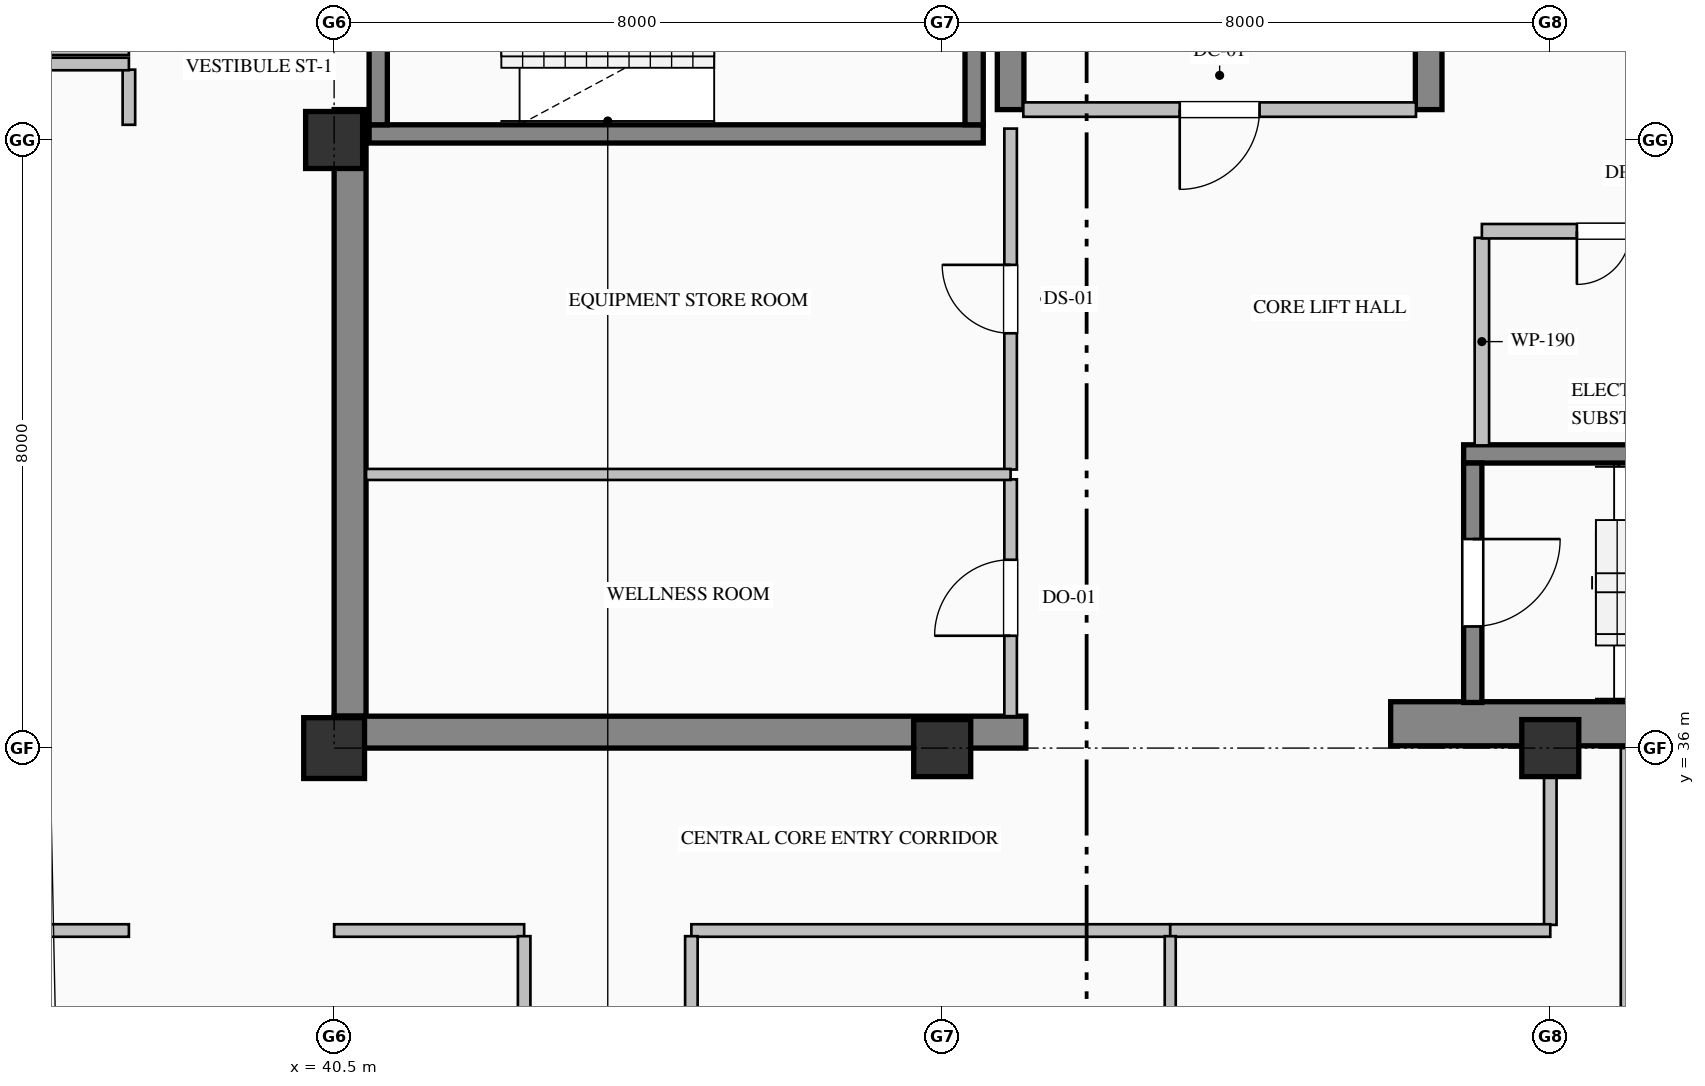
"""IFC4 building model, lengths in metres.
Left out: names, types, materials, properties, quantities, classifications, styles, units other than length and angle.
Written with IfcOpenShell. Run it as: python <this file> out.ifc"""

import sys

from ifc_helpers import new_model, si_unit, direction, frame, frame_2d, origin, origin_2d, place, context, subcontext, project, spatial, rectangle, hollow_rectangle, extrude, element, fill, save


model = new_model("IFC4")
c1 = context("Model", 3, precision=1e-05, world=origin(), true_north=direction((0.0, 1.0)))
c2 = subcontext(c1, "Body", "Model", "MODEL_VIEW")
j1 = project(units=[si_unit("LENGTHUNIT", "METRE"), si_unit("PLANEANGLEUNIT", "RADIAN")], contexts=[c1])
p1 = place(None, origin())
s1 = spatial("IfcSite", under=j1, at=p1, CompositionType="ELEMENT")
p2 = place(p1, origin())
s2 = spatial("IfcBuilding", under=s1, at=p2, CompositionType="ELEMENT")
p3 = place(p2, frame((0.0, 0.0, 331.2)))
s3 = spatial("IfcBuildingStorey", under=s2, at=p3, CompositionType="ELEMENT", Elevation=331.2)
p4 = place(p3, frame((40.71, 36.42, 0.0), z_axis=(0.0, 0.0, 1.0), x_axis=(0.0, 1.0, 0.0)))
e1 = element("IfcWall", 1, at=p4, inside=s3, PredefinedType="SHEAR", context=c2, shape_type="SweptSolid", body=[
    extrude(rectangle(XDim=7.98, YDim=0.42, at=frame_2d((3.99, 0.0))), origin(), (0.0, 0.0, 1.0), 3.785),
])
p5 = place(p3, frame((40.5, 36.21, 0.0), z_axis=(0.0, 0.0, 1.0), x_axis=(1.0, 0.0, 0.0)))
e2 = element("IfcWall", 2, at=p5, inside=s3, PredefinedType="SHEAR", context=c2, shape_type="SweptSolid", body=[
    extrude(rectangle(XDim=9.1, YDim=0.42, at=frame_2d((4.55, 0.0))), origin(), (0.0, 0.0, 1.0), 3.785),
])
p6 = place(p3, frame((54.4, 36.32, 0.0), z_axis=(0.0, 0.0, 1.0), x_axis=(1.0, 0.0, 0.0)))
e3 = element("IfcWall", 3, at=p6, inside=s3, PredefinedType="SHEAR", context=c2, shape_type="SweptSolid", body=[
    extrude(rectangle(XDim=9.6, YDim=0.58, at=frame_2d((4.8, 0.0))), origin(), (0.0, 0.0, 1.0), 4.0),
])
p7 = place(p3, frame((49.4, 44.4, 0.0), z_axis=(0.0, 0.0, 1.0), x_axis=(0.0, 1.0, 0.0)))
e4 = element("IfcWall", 4, at=p7, inside=s3, PredefinedType="SHEAR", context=c2, shape_type="SweptSolid", body=[
    extrude(rectangle(XDim=3.0, YDim=0.35, at=frame_2d((1.5, 0.0))), origin(), (0.0, 0.0, 1.0), 3.785),
])
p8 = place(p3, frame((54.9, 44.4, 0.0), z_axis=(0.0, 0.0, 1.0), x_axis=(0.0, 1.0, 0.0)))
e5 = element("IfcWall", 5, at=p8, inside=s3, PredefinedType="SHEAR", context=c2, shape_type="SweptSolid", body=[
    extrude(rectangle(XDim=7.18, YDim=0.35, at=frame_2d((3.59, 0.0))), origin(), (0.0, 0.0, 1.0), 3.785),
])
p9 = place(p3, frame((40.5, 36.0, 0.0), z_axis=(0.0, 0.0, 1.0), x_axis=(1.0, 0.0, 0.0)))
e6 = element("IfcColumn", 6, at=p9, inside=s3, PredefinedType="COLUMN", context=c2, shape_type="SweptSolid", body=[
    extrude(hollow_rectangle(XDim=0.8, YDim=0.8, WallThickness=0.032, at=origin_2d()), origin(), (0.0, 0.0, 1.0), 4.0),
])
for number, where, z_axis, x_axis in (
    (7, (40.5, 44.0, 0.0), (0.0, 0.0, 1.0), (1.0, 0.0, 0.0)),
    (8, (48.5, 36.0, 0.0), (0.0, 0.0, 1.0), (1.0, 0.0, 0.0)),
    (9, (56.5, 36.0, 0.0), (0.0, 0.0, 1.0), (1.0, 0.0, 0.0)),
):
    element("IfcColumn", number, at=place(p3, frame(where, z_axis=z_axis, x_axis=x_axis)), inside=s3, PredefinedType="COLUMN", context=c2, shape_type="SweptSolid", body=[
        extrude(rectangle(XDim=0.75, YDim=0.75, at=origin_2d()), origin(), (0.0, 0.0, 1.0), 4.0),
    ])
p10 = place(p3, frame((49.04, 44.08, 0.0), z_axis=(0.0, 0.0, 1.0), x_axis=(-1.0, 0.0, 0.0)))
e10 = element("IfcWall", 10, at=p10, inside=s3, PredefinedType="SOLIDWALL", context=c2, shape_type="SweptSolid", body=[
    extrude(rectangle(XDim=8.08, YDim=0.24, at=frame_2d((4.04, 0.0))), origin(), (0.0, 0.0, 1.0), 4.0),
])
p11 = place(p3, frame((41.08, 47.35, 0.0), z_axis=(0.0, 0.0, 1.0), x_axis=(0.0, -1.0, 0.0)))
e11 = element("IfcWall", 11, at=p11, inside=s3, PredefinedType="SOLIDWALL", context=c2, shape_type="SweptSolid", body=[
    extrude(rectangle(XDim=3.15, YDim=0.24, at=frame_2d((1.575, 0.0))), origin(), (0.0, 0.0, 1.0), 4.0),
])
p12 = place(p11, frame((1.0, 0.0, 0.0)))
e12 = element("IfcOpeningElement", 12, at=p12, cuts=e11, PredefinedType="OPENING", context=c2, shape_type="SweptSolid", body=[
    extrude(rectangle(XDim=1.15, YDim=2.2, at=frame_2d((0.575, 1.1))), frame((0.0, 0.13, 0.0), z_axis=(0.0, -1.0, 0.0), x_axis=(1.0, 0.0, 0.0)), (0.0, 0.0, 1.0), 0.26),
])
p13 = place(p3, frame((48.92, 44.2, 0.0), z_axis=(0.0, 0.0, 1.0), x_axis=(0.0, 1.0, 0.0)))
e13 = element("IfcWall", 13, at=p13, inside=s3, PredefinedType="SOLIDWALL", context=c2, shape_type="SweptSolid", body=[
    extrude(rectangle(XDim=3.15, YDim=0.24, at=frame_2d((1.575, 0.0))), origin(), (0.0, 0.0, 1.0), 4.0),
])
p14 = place(p3, frame((55.36, 39.87, 0.0), z_axis=(0.0, 0.0, 1.0), x_axis=(1.0, 0.0, 0.0)))
e14 = element("IfcWall", 14, at=p14, inside=s3, PredefinedType="SOLIDWALL", context=c2, shape_type="SweptSolid", body=[
    extrude(rectangle(XDim=8.08, YDim=0.24, at=frame_2d((4.04, 0.0))), origin(), (0.0, 0.0, 1.0), 4.0),
])
p15 = place(p3, frame((55.48, 39.75, 0.0), z_axis=(0.0, 0.0, 1.0), x_axis=(0.0, -1.0, 0.0)))
e15 = element("IfcWall", 15, at=p15, inside=s3, PredefinedType="SOLIDWALL", context=c2, shape_type="SweptSolid", body=[
    extrude(rectangle(XDim=3.15, YDim=0.24, at=frame_2d((1.575, 0.0))), origin(), (0.0, 0.0, 1.0), 4.0),
])
p16 = place(p15, frame((1.0, 0.0, 0.0)))
e16 = element("IfcOpeningElement", 16, at=p16, cuts=e15, PredefinedType="OPENING", context=c2, shape_type="SweptSolid", body=[
    extrude(rectangle(XDim=1.15, YDim=2.2, at=frame_2d((0.575, 1.1))), frame((0.0, 0.13, 0.0), z_axis=(0.0, -1.0, 0.0), x_axis=(1.0, 0.0, 0.0)), (0.0, 0.0, 1.0), 0.26),
])
p17 = place(p3, frame((37.8, 44.2, 0.0), z_axis=(0.0, 0.0, 1.0), x_axis=(0.0, 1.0, 0.0)))
e17 = element("IfcWall", 17, at=p17, inside=s3, PredefinedType="PARTITIONING", context=c2, shape_type="SweptSolid", body=[
    extrude(rectangle(XDim=0.726, YDim=0.165, at=frame_2d((0.363, 0.0))), origin(), (0.0, 0.0, 1.0), 3.785),
])
p18 = place(p3, frame((54.733, 44.4, 0.0), z_axis=(0.0, 0.0, 1.0), x_axis=(-1.0, 0.0, 0.0)))
e18 = element("IfcWall", 18, at=p18, inside=s3, PredefinedType="PARTITIONING", context=c2, shape_type="SweptSolid", body=[
    extrude(rectangle(XDim=5.166, YDim=0.19, at=frame_2d((2.583, 0.0))), origin(), (0.0, 0.0, 1.0), 3.785),
])
p19 = place(p18, frame((2.058, 0.0, 0.0)))
e19 = element("IfcOpeningElement", 19, at=p19, cuts=e18, PredefinedType="OPENING", context=c2, shape_type="SweptSolid", body=[
    extrude(rectangle(XDim=1.05, YDim=2.15, at=frame_2d((0.525, 1.075))), frame((0.0, 0.105, 0.0), z_axis=(0.0, -1.0, 0.0), x_axis=(1.0, 0.0, 0.0)), (0.0, 0.0, 1.0), 0.21),
])
p20 = place(p3, frame((49.4, 36.42, 0.0), z_axis=(0.0, 0.0, 1.0), x_axis=(0.0, 1.0, 0.0)))
e20 = element("IfcWall", 20, at=p20, inside=s3, PredefinedType="PARTITIONING", context=c2, shape_type="SweptSolid", body=[
    extrude(rectangle(XDim=3.115, YDim=0.165, at=frame_2d((1.558, 0.0))), origin(), (0.0, 0.0, 1.0), 3.027),
])
p21 = place(p20, frame((1.058, 0.0, 0.0)))
e21 = element("IfcOpeningElement", 21, at=p21, cuts=e20, PredefinedType="OPENING", context=c2, shape_type="SweptSolid", body=[
    extrude(rectangle(XDim=1.0, YDim=2.15, at=frame_2d((0.5, 1.075))), frame((0.0, 0.093, 0.0), z_axis=(0.0, -1.0, 0.0), x_axis=(1.0, 0.0, 0.0)), (0.0, 0.0, 1.0), 0.185),
])
p22 = place(p3, frame((49.4, 39.665, 0.0), z_axis=(0.0, 0.0, 1.0), x_axis=(0.0, 1.0, 0.0)))
e22 = element("IfcWall", 22, at=p22, inside=s3, PredefinedType="PARTITIONING", context=c2, shape_type="SweptSolid", body=[
    extrude(rectangle(XDim=4.485, YDim=0.165, at=frame_2d((2.243, 0.0))), origin(), (0.0, 0.0, 1.0), 3.027),
])
p23 = place(p22, frame((1.793, 0.0, 0.0)))
e23 = element("IfcOpeningElement", 23, at=p23, cuts=e22, PredefinedType="OPENING", context=c2, shape_type="SweptSolid", body=[
    extrude(rectangle(XDim=0.9, YDim=2.15, at=frame_2d((0.45, 1.075))), frame((0.0, 0.093, 0.0), z_axis=(0.0, -1.0, 0.0), x_axis=(1.0, 0.0, 0.0)), (0.0, 0.0, 1.0), 0.185),
])
p24 = place(p3, frame((55.6, 42.713, 0.0), z_axis=(0.0, 0.0, 1.0), x_axis=(0.0, -1.0, 0.0)))
e24 = element("IfcWall", 24, at=p24, inside=s3, PredefinedType="PARTITIONING", context=c2, shape_type="SweptSolid", body=[
    extrude(rectangle(XDim=2.731, YDim=0.19, at=frame_2d((1.365, 0.0))), origin(), (0.0, 0.0, 1.0), 3.785),
])
p25 = place(p3, frame((40.92, 39.6, 0.0), z_axis=(0.0, 0.0, 1.0), x_axis=(1.0, 0.0, 0.0)))
e25 = element("IfcWall", 25, at=p25, inside=s3, PredefinedType="PARTITIONING", context=c2, shape_type="SweptSolid", body=[
    extrude(rectangle(XDim=8.48, YDim=0.145, at=frame_2d((4.24, 0.0))), origin(), (0.0, 0.0, 1.0), 3.785),
])
p26 = place(p3, frame((59.5, 42.8, 0.0), z_axis=(0.0, 0.0, 1.0), x_axis=(-1.0, 0.0, 0.0)))
e26 = element("IfcWall", 26, at=p26, inside=s3, PredefinedType="PARTITIONING", context=c2, shape_type="SweptSolid", body=[
    extrude(rectangle(XDim=3.9, YDim=0.19, at=frame_2d((1.95, 0.0))), origin(), (0.0, 0.0, 1.0), 3.785),
])
p27 = place(p26, frame((1.25, 0.0, 0.0)))
e27 = element("IfcOpeningElement", 27, at=p27, cuts=e26, PredefinedType="OPENING", context=c2, shape_type="SweptSolid", body=[
    extrude(rectangle(XDim=1.4, YDim=2.25, at=frame_2d((0.7, 1.125))), frame((0.0, 0.105, 0.0), z_axis=(0.0, -1.0, 0.0), x_axis=(1.0, 0.0, 0.0)), (0.0, 0.0, 1.0), 0.21),
])
p28 = place(p3, frame((37.8, 45.2, 0.0), z_axis=(0.0, 0.0, 1.0), x_axis=(-1.0, 0.0, 0.0)))
e28 = element("IfcWall", 28, at=p28, inside=s3, PredefinedType="PARTITIONING", context=c2, shape_type="SweptSolid", body=[
    extrude(rectangle(XDim=13.3, YDim=0.165, at=frame_2d((6.65, 0.0))), origin(), (0.0, 0.0, 1.0), 3.785),
])
p29 = place(p28, frame((6.15, 0.0, 0.0)))
e29 = element("IfcOpeningElement", 29, at=p29, cuts=e28, PredefinedType="OPENING", context=c2, shape_type="SweptSolid", body=[
    extrude(rectangle(XDim=1.0, YDim=2.15, at=frame_2d((0.5, 1.075))), frame((0.0, 0.093, 0.0), z_axis=(0.0, -1.0, 0.0), x_axis=(1.0, 0.0, 0.0)), (0.0, 0.0, 1.0), 0.185),
])
for number, where, z_axis, x_axis in (
    (30, (37.8, 33.6, 0.0), (0.0, 0.0, 1.0), (-1.0, 0.0, 0.0)),
    (31, (35.4, 45.0, 0.0), (0.0, 0.0, 1.0), (1.0, 0.0, 0.0)),
):
    element("IfcWall", number, at=place(p3, frame(where, z_axis=z_axis, x_axis=x_axis)), inside=s3, PredefinedType="PARTITIONING", context=c2, shape_type="SweptSolid", body=[
        extrude(rectangle(XDim=2.4, YDim=0.165, at=frame_2d((1.2, 0.0))), origin(), (0.0, 0.0, 1.0), 3.785),
    ])
p30 = place(p3, frame((51.5, 33.6, 0.0), z_axis=(0.0, 0.0, 1.0), x_axis=(-1.0, 0.0, 0.0)))
e32 = element("IfcWall", 32, at=p30, inside=s3, PredefinedType="PARTITIONING", context=c2, shape_type="SweptSolid", body=[
    extrude(rectangle(XDim=6.3, YDim=0.165, at=frame_2d((3.15, 0.0))), origin(), (0.0, 0.0, 1.0), 3.785),
])
p31 = place(p3, frame((56.5, 36.0, 0.0), z_axis=(0.0, 0.0, 1.0), x_axis=(0.0, -1.0, 0.0)))
e33 = element("IfcWall", 33, at=p31, inside=s3, PredefinedType="PARTITIONING", context=c2, shape_type="SweptSolid", body=[
    extrude(rectangle(XDim=2.325, YDim=0.165, at=frame_2d((1.163, 0.0))), origin(), (0.0, 0.0, 1.0), 3.177),
])
p32 = place(p3, frame((56.5, 33.6, 0.0), z_axis=(0.0, 0.0, 1.0), x_axis=(-1.0, 0.0, 0.0)))
e34 = element("IfcWall", 34, at=p32, inside=s3, PredefinedType="PARTITIONING", context=c2, shape_type="SweptSolid", body=[
    extrude(rectangle(XDim=5.0, YDim=0.165, at=frame_2d((2.5, 0.0))), origin(), (0.0, 0.0, 1.0), 3.785),
])
p33 = place(p3, frame((43.0, 33.6, 0.0), z_axis=(0.0, 0.0, 1.0), x_axis=(-1.0, 0.0, 0.0)))
e35 = element("IfcWall", 35, at=p33, inside=s3, PredefinedType="PARTITIONING", context=c2, shape_type="SweptSolid", body=[
    extrude(rectangle(XDim=2.5, YDim=0.165, at=frame_2d((1.25, 0.0))), origin(), (0.0, 0.0, 1.0), 3.785),
])
p34 = place(p3, frame((45.2, 33.525, 0.0), z_axis=(0.0, 0.0, 1.0), x_axis=(0.0, -1.0, 0.0)))
e36 = element("IfcWall", 36, at=p34, inside=s3, PredefinedType="PARTITIONING", context=c2, shape_type="SweptSolid", body=[
    extrude(rectangle(XDim=8.451, YDim=0.165, at=frame_2d((4.226, 0.0))), origin(), (0.0, 0.0, 1.0), 3.785),
])
p35 = place(p34, frame((3.726, 0.0, 0.0)))
e37 = element("IfcOpeningElement", 37, at=p35, cuts=e36, PredefinedType="OPENING", context=c2, shape_type="SweptSolid", body=[
    extrude(rectangle(XDim=1.0, YDim=2.15, at=frame_2d((0.5, 1.075))), frame((0.0, 0.093, 0.0), z_axis=(0.0, -1.0, 0.0), x_axis=(1.0, 0.0, 0.0)), (0.0, 0.0, 1.0), 0.185),
])
p36 = place(p3, frame((43.0, 22.875, 0.0), z_axis=(0.0, 0.0, 1.0), x_axis=(0.0, 1.0, 0.0)))
e38 = element("IfcWall", 38, at=p36, inside=s3, PredefinedType="PARTITIONING", context=c2, shape_type="SweptSolid", body=[
    extrude(rectangle(XDim=10.651, YDim=0.165, at=frame_2d((5.325, 0.0))), origin(), (0.0, 0.0, 1.0), 3.785),
])
p37 = place(p36, frame((4.825, 0.0, 0.0)))
e39 = element("IfcOpeningElement", 39, at=p37, cuts=e38, PredefinedType="OPENING", context=c2, shape_type="SweptSolid", body=[
    extrude(rectangle(XDim=1.0, YDim=2.15, at=frame_2d((0.5, 1.075))), frame((0.0, 0.093, 0.0), z_axis=(0.0, -1.0, 0.0), x_axis=(1.0, 0.0, 0.0)), (0.0, 0.0, 1.0), 0.185),
])
p38 = place(p3, frame((51.5, 33.525, 0.0), z_axis=(0.0, 0.0, 1.0), x_axis=(0.0, -1.0, 0.0)))
e40 = element("IfcWall", 40, at=p38, inside=s3, PredefinedType="PARTITIONING", context=c2, shape_type="SweptSolid", body=[
    extrude(rectangle(XDim=8.451, YDim=0.145, at=frame_2d((4.226, 0.0))), origin(), (0.0, 0.0, 1.0), 3.785),
])
p39 = place(p3, frame((57.5, 36.0, 0.0), z_axis=(0.0, 0.0, 1.0), x_axis=(0.0, -1.0, 0.0)))
e41 = element("IfcWall", 41, at=p39, inside=s3, PredefinedType="PARTITIONING", context=c2, shape_type="SweptSolid", body=[
    extrude(rectangle(XDim=10.926, YDim=0.145, at=frame_2d((5.463, 0.0))), origin(), (0.0, 0.0, 1.0), 3.785),
])
p40 = place(p16, origin())
e42 = element("IfcDoor", 42, at=p40, inside=s3, OperationType="SINGLE_SWING_LEFT", PredefinedType="DOOR", context=c2, shape_type="SweptSolid", body=[
    extrude(rectangle(XDim=1.15, YDim=2.2, at=frame_2d((0.575, 1.1))), frame((0.0, 0.025, 0.0), z_axis=(0.0, -1.0, 0.0), x_axis=(1.0, 0.0, 0.0)), (0.0, 0.0, 1.0), 0.05),
])
fill(e16, e42)
p41 = place(p19, origin())
e43 = element("IfcDoor", 43, at=p41, inside=s3, OperationType="SINGLE_SWING_RIGHT", PredefinedType="DOOR", context=c2, shape_type="SweptSolid", body=[
    extrude(rectangle(XDim=1.05, YDim=2.15, at=frame_2d((0.525, 1.075))), frame((0.0, 0.025, 0.0), z_axis=(0.0, -1.0, 0.0), x_axis=(1.0, 0.0, 0.0)), (0.0, 0.0, 1.0), 0.05),
])
fill(e19, e43)
p42 = place(p21, origin())
e44 = element("IfcDoor", 44, at=p42, inside=s3, OperationType="SINGLE_SWING_LEFT", PredefinedType="DOOR", context=c2, shape_type="SweptSolid", body=[
    extrude(rectangle(XDim=1.0, YDim=2.15, at=frame_2d((0.5, 1.075))), frame((0.0, 0.025, 0.0), z_axis=(0.0, -1.0, 0.0), x_axis=(1.0, 0.0, 0.0)), (0.0, 0.0, 1.0), 0.05),
])
fill(e21, e44)
p43 = place(p23, origin())
e45 = element("IfcDoor", 45, at=p43, inside=s3, OperationType="SINGLE_SWING_RIGHT", PredefinedType="DOOR", context=c2, shape_type="SweptSolid", body=[
    extrude(rectangle(XDim=0.9, YDim=2.15, at=frame_2d((0.45, 1.075))), frame((0.0, 0.025, 0.0), z_axis=(0.0, -1.0, 0.0), x_axis=(1.0, 0.0, 0.0)), (0.0, 0.0, 1.0), 0.05),
])
fill(e23, e45)
p44 = place(p27, origin())
e46 = element("IfcDoor", 46, at=p44, inside=s3, OperationType="DOUBLE_DOOR_SINGLE_SWING", PredefinedType="DOOR", context=c2, shape_type="SweptSolid", body=[
    extrude(rectangle(XDim=1.4, YDim=2.25, at=frame_2d((0.7, 1.125))), frame((0.0, 0.025, 0.0), z_axis=(0.0, -1.0, 0.0), x_axis=(1.0, 0.0, 0.0)), (0.0, 0.0, 1.0), 0.05),
])
fill(e27, e46)
save(model, sys.argv[1])
